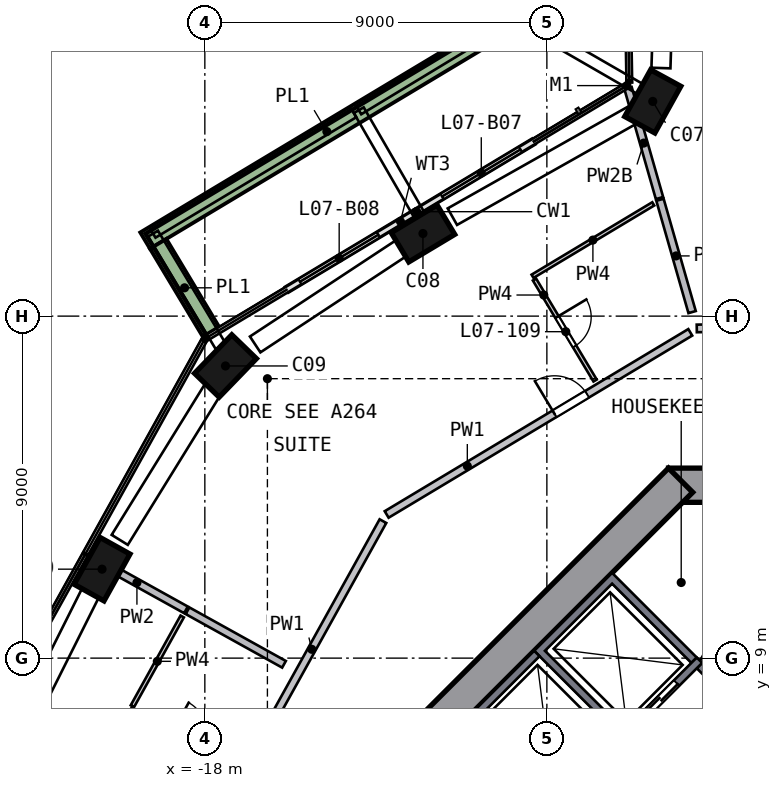
"""IFC4 building model, lengths in metres.
Left out: names, types, materials, properties, quantities, classifications, styles, units other than length and angle.
Written with IfcOpenShell. Run it as: python <this file> out.ifc"""

import sys

from ifc_helpers import new_model, si_unit, direction, frame, frame_2d, origin, origin_2d, place, context, subcontext, project, spatial, polyline, rectangle, outline, extrude, element, fill, save


model = new_model("IFC4")
c1 = context("Model", 3, precision=1e-05, world=origin(), true_north=direction((0.0, 1.0)))
c2 = subcontext(c1, "Body", "Model", "MODEL_VIEW")
j1 = project(units=[si_unit("LENGTHUNIT", "METRE"), si_unit("PLANEANGLEUNIT", "RADIAN")], contexts=[c1])
p1 = place(None, origin())
s1 = spatial("IfcSite", under=j1, at=p1, CompositionType="ELEMENT")
p2 = place(p1, origin())
s2 = spatial("IfcBuilding", under=s1, at=p2, CompositionType="ELEMENT")
p3 = place(p2, frame((0.0, 0.0, 39.0)))
s3 = spatial("IfcBuildingStorey", under=s2, at=p3, CompositionType="ELEMENT", Elevation=39.0)
p4 = place(p3, frame((-6.078, 23.686, 0.0), z_axis=(-0.112426319, -0.029797915, 0.993213173), x_axis=(0.478316462, 0.874501313, 0.080379195)))
e1 = element("IfcColumn", 1, at=p4, inside=s3, PredefinedType="COLUMN", context=c2, shape_type="SweptSolid", body=[
    extrude(rectangle(XDim=1.4, YDim=0.9, at=origin_2d()), origin(), (0.0, 0.0, 1.0), 3.212),
])
p5 = place(p3, frame((-12.145, 20.245, 0.0), z_axis=(-0.095823061, -0.058634587, 0.993669928), x_axis=(-0.851951728, -0.511428467, -0.112335108)))
e2 = element("IfcColumn", 2, at=p5, inside=s3, PredefinedType="COLUMN", context=c2, shape_type="SweptSolid", body=[
    extrude(rectangle(XDim=1.4, YDim=0.9, at=origin_2d()), origin(), (0.0, 0.0, 1.0), 3.21),
])
p6 = place(p3, frame((-17.361, 16.789, 0.0), z_axis=(-0.079220615, -0.08325007, 0.993374813), x_axis=(0.690875568, 0.713782466, 0.114915364)))
e3 = element("IfcColumn", 3, at=p6, inside=s3, PredefinedType="COLUMN", context=c2, shape_type="SweptSolid", body=[
    extrude(rectangle(XDim=1.4, YDim=0.9, at=origin_2d()), origin(), (0.0, 0.0, 1.0), 3.211),
])
p7 = place(p3, frame((-20.64, 11.46, 0.0), z_axis=(-0.053691551, -0.098637311, 0.99367394), x_axis=(-0.482457023, -0.868690978, -0.112299622)))
e4 = element("IfcColumn", 4, at=p7, inside=s3, PredefinedType="COLUMN", context=c2, shape_type="SweptSolid", body=[
    extrude(rectangle(XDim=1.4, YDim=0.9, at=origin_2d()), origin(), (0.0, 0.0, 1.0), 3.21),
])
p8 = place(p3, frame((5.799, 13.55, 0.0), z_axis=(0.0, 0.0, 1.0), x_axis=(-1.0, 0.0, 0.0)))
e5 = element("IfcWall", 5, at=p8, inside=s3, PredefinedType="SHEAR", context=c2, shape_type="SweptSolid", body=[
    extrude(rectangle(XDim=11.598, YDim=0.9, at=frame_2d((5.799, 0.0))), origin(), (0.0, 0.0, 1.0), 3.5),
])
p9 = place(p8, frame((4.899, 0.0, 0.0)))
e6 = element("IfcOpeningElement", 6, at=p9, cuts=e5, PredefinedType="OPENING", context=c2, shape_type="SweptSolid", body=[
    extrude(rectangle(XDim=1.8, YDim=2.1, at=frame_2d((0.9, 1.05))), frame((0.0, 0.46, 0.0), z_axis=(0.0, -1.0, 0.0), x_axis=(1.0, 0.0, 0.0)), (0.0, 0.0, 1.0), 0.92),
])
p10 = place(p3, frame((-5.481, 13.682, 0.0), z_axis=(0.0, 0.0, 1.0), x_axis=(-0.707106781, -0.707106781, 0.0)))
e7 = element("IfcWall", 7, at=p10, inside=s3, PredefinedType="SHEAR", context=c2, shape_type="SweptSolid", body=[
    extrude(rectangle(XDim=11.598, YDim=0.9, at=frame_2d((5.799, 0.0))), origin(), (0.0, 0.0, 1.0), 3.5),
])
p11 = place(p3, frame((-9.354, 22.59, 0.0), z_axis=(0.0, 0.0, 1.0), x_axis=(-0.857522843, -0.51444589, 0.0)))
e8 = element("IfcWall", 8, at=p11, inside=s3, PredefinedType="SOLIDWALL", context=c2, shape_type="SweptSolid", body=[
    extrude(rectangle(XDim=3.6, YDim=0.15, at=frame_2d((1.8, 0.0))), origin(), (0.0, 0.0, 1.0), 2.425),
])
p12 = place(p11, frame((0.4, 0.0, 0.0)))
e9 = element("IfcOpeningElement", 9, at=p12, cuts=e8, PredefinedType="OPENING", context=c2, shape_type="SweptSolid", body=[
    extrude(rectangle(XDim=2.4, YDim=2.4, at=frame_2d((1.2, 1.2))), frame((0.0, 0.085, 0.0), z_axis=(0.0, -1.0, 0.0), x_axis=(1.0, 0.0, 0.0)), (0.0, 0.0, 1.0), 0.17),
])
p13 = place(p3, frame((-12.441, 20.738, 0.0), z_axis=(0.0, 0.0, 1.0), x_axis=(-0.857536436, -0.514423231, 0.0)))
e10 = element("IfcWall", 10, at=p13, inside=s3, PredefinedType="SOLIDWALL", context=c2, shape_type="SweptSolid", body=[
    extrude(rectangle(XDim=3.96, YDim=0.15, at=frame_2d((1.98, 0.0))), origin(), (0.0, 0.0, 1.0), 2.425),
])
p14 = place(p13, frame((1.16, 0.0, 0.0)))
e11 = element("IfcOpeningElement", 11, at=p14, cuts=e10, PredefinedType="OPENING", context=c2, shape_type="SweptSolid", body=[
    extrude(rectangle(XDim=2.4, YDim=2.4, at=frame_2d((1.2, 1.2))), frame((0.0, 0.085, 0.0), z_axis=(0.0, -1.0, 0.0), x_axis=(1.0, 0.0, 0.0)), (0.0, 0.0, 1.0), 0.17),
])
p15 = place(p3, frame((-10.007, 25.725, 0.0), z_axis=(0.0, 0.0, 1.0), x_axis=(-0.857529623, -0.514434589, 0.0)))
e12 = element("IfcWall", 12, at=p15, inside=s3, PredefinedType="SOLIDWALL", context=c2, shape_type="SweptSolid", body=[
    extrude(rectangle(XDim=11.153, YDim=0.5, at=frame_2d((5.576, 0.0))), origin(), (0.0, 0.0, 1.0), 0.7),
])
p16 = place(p3, frame((-19.228, 19.902, 0.0), z_axis=(0.0, 0.0, 1.0), x_axis=(0.514429241, -0.857532831, 0.0)))
e13 = element("IfcWall", 13, at=p16, inside=s3, PredefinedType="SOLIDWALL", context=c2, shape_type="SweptSolid", body=[
    extrude(rectangle(XDim=2.699, YDim=0.5, at=frame_2d((1.35, 0.0))), origin(), (0.0, 0.0, 1.0), 0.7),
])
p17 = place(p3, origin())
e14 = element("IfcWall", 14, at=p17, inside=s3, PredefinedType="SOLIDWALL", context=c2, shape_type="SweptSolid", body=[
    extrude(outline(polyline([(-9.334, 9.192), (-7.283, 11.243), (-5.056, 9.016), (-5.197, 8.874), (-7.283, 10.96), (-9.051, 9.192), (-6.965, 7.106), (-7.106, 6.965), (-9.334, 9.192)])), origin(), (0.0, 0.0, 1.0), 3.19),
])
p18 = place(p3, frame((-4.985, 8.945, 0.0), z_axis=(0.0, 0.0, 1.0), x_axis=(-0.707106781, -0.707106781, 0.0)))
e15 = element("IfcWall", 15, at=p18, inside=s3, PredefinedType="SOLIDWALL", context=c2, shape_type="SweptSolid", body=[
    extrude(rectangle(XDim=2.9, YDim=0.2, at=frame_2d((1.45, 0.0))), origin(), (0.0, 0.0, 1.0), 3.19),
])
p19 = place(p18, frame((0.85, 0.0, 0.0)))
e16 = element("IfcOpeningElement", 16, at=p19, cuts=e15, PredefinedType="OPENING", context=c2, shape_type="SweptSolid", body=[
    extrude(rectangle(XDim=1.2, YDim=2.1, at=frame_2d((0.6, 1.05))), frame((0.0, 0.11, 0.0), z_axis=(0.0, -1.0, 0.0), x_axis=(1.0, 0.0, 0.0)), (0.0, 0.0, 1.0), 0.22),
])
p20 = place(p3, origin())
e17 = element("IfcWall", 17, at=p20, inside=s3, PredefinedType="SOLIDWALL", context=c2, shape_type="SweptSolid", body=[
    extrude(outline(polyline([(-11.243, 7.283), (-9.334, 9.192), (-9.192, 9.051), (-10.96, 7.283), (-8.874, 5.197), (-9.016, 5.056), (-11.243, 7.283)])), origin(), (0.0, 0.0, 1.0), 3.19),
])
p21 = place(p3, frame((-3.005, 6.823, 0.0), z_axis=(0.0, 0.0, 1.0), x_axis=(-0.707106781, 0.707106781, 0.0)))
e18 = element("IfcWall", 18, at=p21, inside=s3, PredefinedType="SOLIDWALL", context=c2, shape_type="SweptSolid", body=[
    extrude(rectangle(XDim=2.8, YDim=0.2, at=frame_2d((1.4, 0.0))), origin(), (0.0, 0.0, 1.0), 3.19),
])
p22 = place(p3, frame((-3.9, 10.7, 0.0), z_axis=(0.0, 0.0, 1.0), x_axis=(-0.485692555, -0.874129705, 0.0)))
e19 = element("IfcWall", 19, at=p22, inside=s3, PredefinedType="PARTITIONING", context=c2, shape_type="SweptSolid", body=[
    extrude(rectangle(XDim=2.089, YDim=0.15, at=frame_2d((1.044, 0.0))), origin(), (0.0, 0.0, 1.0), 3.19),
])
p23 = place(p22, frame((0.594, 0.0, 0.0)))
e20 = element("IfcOpeningElement", 20, at=p23, cuts=e19, PredefinedType="OPENING", context=c2, shape_type="SweptSolid", body=[
    extrude(rectangle(XDim=0.9, YDim=2.1, at=frame_2d((0.45, 1.05))), frame((0.0, 0.085, 0.0), z_axis=(0.0, -1.0, 0.0), x_axis=(1.0, 0.0, 0.0)), (0.0, 0.0, 1.0), 0.17),
])
p24 = place(p3, frame((-17.738, 4.635, 0.0), z_axis=(0.0, 0.0, 1.0), x_axis=(0.485438257, 0.874270953, 0.0)))
e21 = element("IfcWall", 21, at=p24, inside=s3, PredefinedType="SOLIDWALL", context=c2, shape_type="SweptSolid", body=[
    extrude(rectangle(XDim=9.115, YDim=0.2, at=frame_2d((4.558, 0.0))), origin(), (0.0, 0.0, 1.0), 3.19),
])
p25 = place(p24, frame((0.2, 0.0, 0.0)))
e22 = element("IfcOpeningElement", 22, at=p25, cuts=e21, PredefinedType="OPENING", context=c2, shape_type="SweptSolid", body=[
    extrude(rectangle(XDim=1.0, YDim=2.1, at=frame_2d((0.5, 1.05))), frame((0.0, 0.11, 0.0), z_axis=(0.0, -1.0, 0.0), x_axis=(1.0, 0.0, 0.0)), (0.0, 0.0, 1.0), 0.22),
])
p26 = place(p3, frame((-13.216, 12.781, 0.0), z_axis=(0.0, 0.0, 1.0), x_axis=(0.85751836, 0.514453362, 0.0)))
e23 = element("IfcWall", 23, at=p26, inside=s3, PredefinedType="SOLIDWALL", context=c2, shape_type="SweptSolid", body=[
    extrude(rectangle(XDim=9.316, YDim=0.2, at=frame_2d((4.658, 0.0))), origin(), (0.0, 0.0, 1.0), 3.19),
])
p27 = place(p26, frame((5.15, 0.0, 0.0)))
e24 = element("IfcOpeningElement", 24, at=p27, cuts=e23, PredefinedType="OPENING", context=c2, shape_type="SweptSolid", body=[
    extrude(rectangle(XDim=1.0, YDim=2.1, at=frame_2d((0.5, 1.05))), frame((0.0, 0.11, 0.0), z_axis=(0.0, -1.0, 0.0), x_axis=(1.0, 0.0, 0.0)), (0.0, 0.0, 1.0), 0.22),
])
p28 = place(p3, frame((-1.597, 17.734, 0.0), z_axis=(0.0, 0.0, 1.0), x_axis=(-0.999858837, -0.016801977, 0.0)))
e25 = element("IfcWall", 25, at=p28, inside=s3, PredefinedType="SOLIDWALL", context=c2, shape_type="SweptSolid", body=[
    extrude(rectangle(XDim=3.458, YDim=0.2, at=frame_2d((1.729, 0.0))), origin(), (0.0, 0.0, 1.0), 3.19),
])
p29 = place(p3, frame((-18.497, 10.27, 0.0), z_axis=(0.0, 0.0, 1.0), x_axis=(-0.874289886, 0.485404157, 0.0)))
e26 = element("IfcWall", 26, at=p29, inside=s3, PredefinedType="SOLIDWALL", context=c2, shape_type="SweptSolid", body=[
    extrude(rectangle(XDim=2.952, YDim=0.2, at=frame_2d((1.476, 0.0))), origin(), (0.0, 0.0, 1.0), 3.19),
])
p30 = place(p3, frame((-15.917, 8.837, 0.0), z_axis=(0.0, 0.0, 1.0), x_axis=(-0.874296003, 0.485393138, 0.0)))
e27 = element("IfcWall", 27, at=p30, inside=s3, PredefinedType="SOLIDWALL", context=c2, shape_type="SweptSolid", body=[
    extrude(rectangle(XDim=2.905, YDim=0.2, at=frame_2d((1.452, 0.0))), origin(), (0.0, 0.0, 1.0), 3.19),
])
p31 = place(p3, frame((-6.036, 21.106, 0.0), z_axis=(0.0, 0.0, 1.0), x_axis=(-0.274999518, 0.961444364, 0.0)))
e28 = element("IfcWall", 28, at=p31, inside=s3, PredefinedType="SOLIDWALL", context=c2, shape_type="SweptSolid", body=[
    extrude(rectangle(XDim=3.011, YDim=0.2, at=frame_2d((1.506, 0.0))), origin(), (0.0, 0.0, 1.0), 2.69),
])
p32 = place(p3, frame((-5.178, 18.106, 0.0), z_axis=(0.0, 0.0, 1.0), x_axis=(-0.274983308, 0.961449, 0.0)))
e29 = element("IfcWall", 29, at=p32, inside=s3, PredefinedType="SOLIDWALL", context=c2, shape_type="SweptSolid", body=[
    extrude(rectangle(XDim=3.074, YDim=0.2, at=frame_2d((1.537, 0.0))), origin(), (0.0, 0.0, 1.0), 3.19),
])
p33 = place(p3, frame((-19.906, 7.735, 0.0), z_axis=(0.0, 0.0, 1.0), x_axis=(0.485427932, 0.874276685, 0.0)))
e30 = element("IfcWall", 30, at=p33, inside=s3, PredefinedType="PARTITIONING", context=c2, shape_type="SweptSolid", body=[
    extrude(rectangle(XDim=2.7, YDim=0.1, at=frame_2d((1.35, 0.0))), origin(), (0.0, 0.0, 1.0), 3.19),
])
p34 = place(p3, frame((-19.955, 7.648, 0.0), z_axis=(0.0, 0.0, 1.0), x_axis=(0.874290404, -0.485403224, 0.0)))
e31 = element("IfcWall", 31, at=p34, inside=s3, PredefinedType="PARTITIONING", context=c2, shape_type="SweptSolid", body=[
    extrude(rectangle(XDim=3.2, YDim=0.1, at=frame_2d((1.6, 0.0))), origin(), (0.0, 0.0, 1.0), 3.19),
])
p35 = place(p34, frame((1.25, 0.0, 0.0)))
e32 = element("IfcOpeningElement", 32, at=p35, cuts=e31, PredefinedType="OPENING", context=c2, shape_type="SweptSolid", body=[
    extrude(rectangle(XDim=0.9, YDim=2.1, at=frame_2d((0.45, 1.05))), frame((0.0, 0.06, 0.0), z_axis=(0.0, -1.0, 0.0), x_axis=(1.0, 0.0, 0.0)), (0.0, 0.0, 1.0), 0.12),
])
p36 = place(p3, frame((-9.325, 18.963, 0.0), z_axis=(0.0, 0.0, 1.0), x_axis=(0.514414684, -0.857541563, 0.0)))
e33 = element("IfcWall", 33, at=p36, inside=s3, PredefinedType="PARTITIONING", context=c2, shape_type="SweptSolid", body=[
    extrude(rectangle(XDim=3.1, YDim=0.1, at=frame_2d((1.55, 0.0))), origin(), (0.0, 0.0, 1.0), 3.19),
])
p37 = place(p36, frame((1.15, 0.0, 0.0)))
e34 = element("IfcOpeningElement", 34, at=p37, cuts=e33, PredefinedType="OPENING", context=c2, shape_type="SweptSolid", body=[
    extrude(rectangle(XDim=0.9, YDim=2.1, at=frame_2d((0.45, 1.05))), frame((0.0, 0.06, 0.0), z_axis=(0.0, -1.0, 0.0), x_axis=(1.0, 0.0, 0.0)), (0.0, 0.0, 1.0), 0.12),
])
p38 = place(p3, frame((-9.377, 19.048, 0.0), z_axis=(0.0, 0.0, 1.0), x_axis=(0.857522003, 0.51444729, 0.0)))
e35 = element("IfcWall", 35, at=p38, inside=s3, PredefinedType="PARTITIONING", context=c2, shape_type="SweptSolid", body=[
    extrude(rectangle(XDim=3.704, YDim=0.1, at=frame_2d((1.852, 0.0))), origin(), (0.0, 0.0, 1.0), 3.19),
])
p39 = place(p12, origin())
e36 = element("IfcDoor", 36, at=p39, inside=s3, OperationType="SLIDING_TO_RIGHT", PredefinedType="DOOR", context=c2, shape_type="SweptSolid", body=[
    extrude(rectangle(XDim=2.4, YDim=2.4, at=frame_2d((1.2, 1.2))), frame((0.0, 0.025, 0.0), z_axis=(0.0, -1.0, 0.0), x_axis=(1.0, 0.0, 0.0)), (0.0, 0.0, 1.0), 0.05),
])
fill(e9, e36)
p40 = place(p14, origin())
e37 = element("IfcDoor", 37, at=p40, inside=s3, OperationType="SLIDING_TO_LEFT", PredefinedType="DOOR", context=c2, shape_type="SweptSolid", body=[
    extrude(rectangle(XDim=2.4, YDim=2.4, at=frame_2d((1.2, 1.2))), frame((0.0, 0.025, 0.0), z_axis=(0.0, -1.0, 0.0), x_axis=(1.0, 0.0, 0.0)), (0.0, 0.0, 1.0), 0.05),
])
fill(e11, e37)
p41 = place(p19, origin())
e38 = element("IfcDoor", 38, at=p41, inside=s3, OperationType="DOUBLE_DOOR_SLIDING", PredefinedType="DOOR", context=c2, shape_type="SweptSolid", body=[
    extrude(rectangle(XDim=1.2, YDim=2.1, at=frame_2d((0.6, 1.05))), frame((0.0, 0.025, 0.0), z_axis=(0.0, -1.0, 0.0), x_axis=(1.0, 0.0, 0.0)), (0.0, 0.0, 1.0), 0.05),
])
fill(e16, e38)
p42 = place(p27, origin())
e39 = element("IfcDoor", 39, at=p42, inside=s3, OperationType="SINGLE_SWING_LEFT", PredefinedType="DOOR", context=c2, shape_type="SweptSolid", body=[
    extrude(rectangle(XDim=1.0, YDim=2.1, at=frame_2d((0.5, 1.05))), frame((0.0, 0.025, 0.0), z_axis=(0.0, -1.0, 0.0), x_axis=(1.0, 0.0, 0.0)), (0.0, 0.0, 1.0), 0.05),
])
fill(e24, e39)
p43 = place(p37, origin())
e40 = element("IfcDoor", 40, at=p43, inside=s3, OperationType="SINGLE_SWING_LEFT", PredefinedType="DOOR", context=c2, shape_type="SweptSolid", body=[
    extrude(rectangle(XDim=0.9, YDim=2.1, at=frame_2d((0.45, 1.05))), frame((0.0, 0.025, 0.0), z_axis=(0.0, -1.0, 0.0), x_axis=(1.0, 0.0, 0.0)), (0.0, 0.0, 1.0), 0.05),
])
fill(e34, e40)
save(model, sys.argv[1])
